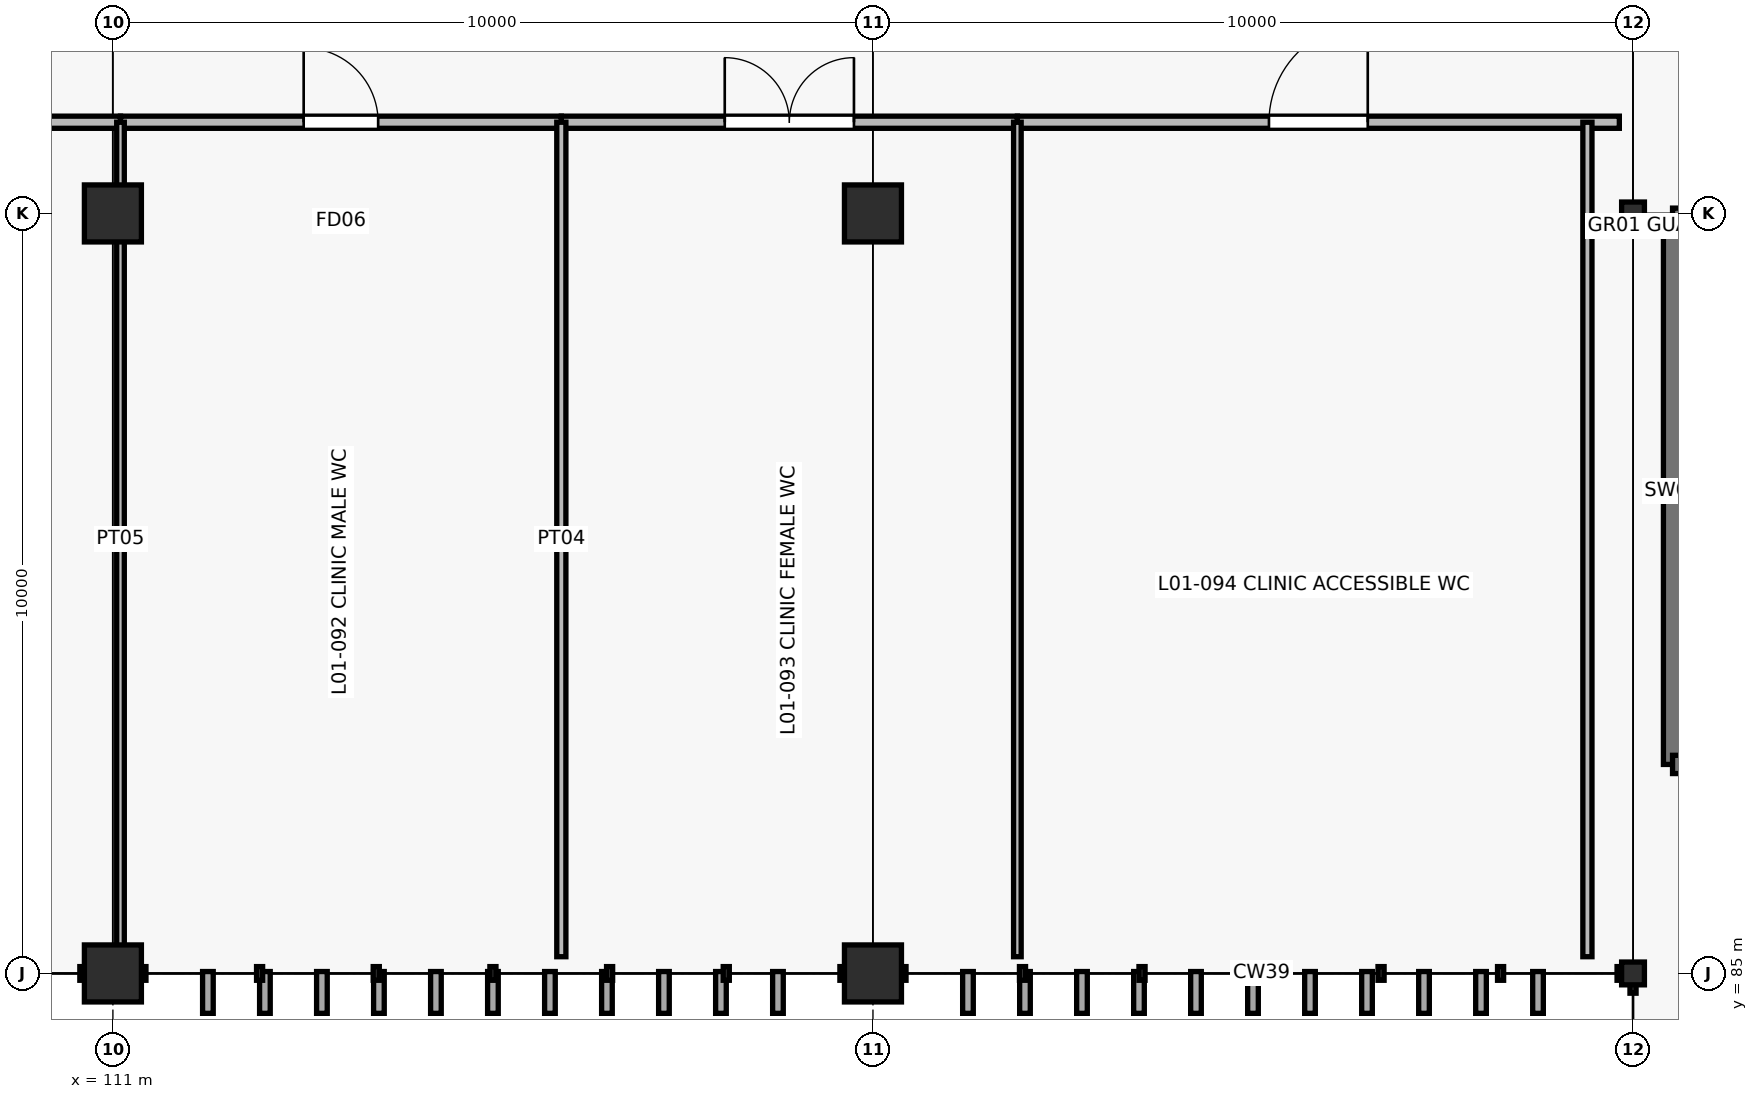
"""IFC4 building model, lengths in metres.
Left out: names, types, materials, properties, quantities, classifications, styles, units other than length and angle.
Written with IfcOpenShell. Run it as: python <this file> out.ifc"""

import sys

from ifc_helpers import new_model, si_unit, direction, frame, frame_2d, origin, origin_2d, place, context, subcontext, project, spatial, rectangle, i_section, extrude, element, fill, save


model = new_model("IFC4")
c1 = context("Model", 3, precision=1e-05, world=origin(), true_north=direction((0.0, 1.0)))
c2 = subcontext(c1, "Body", "Model", "MODEL_VIEW")
j1 = project(units=[si_unit("LENGTHUNIT", "METRE"), si_unit("PLANEANGLEUNIT", "RADIAN")], contexts=[c1])
p1 = place(None, origin())
s1 = spatial("IfcSite", under=j1, at=p1, CompositionType="ELEMENT")
p2 = place(p1, origin())
s2 = spatial("IfcBuilding", under=s1, at=p2, CompositionType="ELEMENT")
p3 = place(p2, frame((0.0, 0.0, 4.8)))
s3 = spatial("IfcBuildingStorey", under=s2, at=p3, CompositionType="ELEMENT", Elevation=4.8)
for number, where, z_axis, x_axis in (
    (1, (131.0, 85.0, 0.0), (0.0, 0.0, 1.0), (1.0, 0.0, 0.0)),
    (2, (131.0, 95.0, 0.0), (0.0, 0.0, 1.0), (1.0, 0.0, 0.0)),
):
    element("IfcColumn", number, at=place(p3, frame(where, z_axis=z_axis, x_axis=x_axis)), inside=s3, PredefinedType="COLUMN", context=c2, shape_type="SweptSolid", body=[
        extrude(i_section(OverallWidth=0.3, OverallDepth=0.3, WebThickness=0.011, FlangeThickness=0.019, at=origin_2d()), origin(), (0.0, 0.0, 1.0), 4.2),
    ])
for number, where, z_axis, x_axis in (
    (3, (111.0, 85.0, 0.0), (0.0, 0.0, 1.0), (1.0, 0.0, 0.0)),
    (4, (111.0, 95.0, 0.0), (0.0, 0.0, 1.0), (1.0, 0.0, 0.0)),
    (5, (121.0, 85.0, 0.0), (0.0, 0.0, 1.0), (1.0, 0.0, 0.0)),
    (6, (121.0, 95.0, 0.0), (0.0, 0.0, 1.0), (1.0, 0.0, 0.0)),
):
    element("IfcColumn", number, at=place(p3, frame(where, z_axis=z_axis, x_axis=x_axis)), inside=s3, PredefinedType="COLUMN", context=c2, shape_type="SweptSolid", body=[
        extrude(rectangle(XDim=0.75, YDim=0.75, at=origin_2d()), origin(), (0.0, 0.0, 1.0), 4.2),
    ])
p4 = place(p3, frame((131.52, 87.75, 0.0), z_axis=(0.0, 0.0, 1.0), x_axis=(0.0, 1.0, 0.0)))
e7 = element("IfcWall", 7, at=p4, inside=s3, PredefinedType="SHEAR", context=c2, shape_type="SweptSolid", body=[
    extrude(rectangle(XDim=7.2, YDim=0.24, at=frame_2d((3.6, 0.0))), origin(), (0.0, 0.0, 1.0), 4.2),
])
p5 = place(p3, frame((131.52, 94.95, 0.0), z_axis=(0.0, 0.0, 1.0), x_axis=(1.0, 0.0, 0.0)))
e8 = element("IfcWall", 8, at=p5, inside=s3, PredefinedType="SHEAR", context=c2, shape_type="SweptSolid", body=[
    extrude(rectangle(XDim=4.16, YDim=0.24, at=frame_2d((2.08, 0.0))), origin(), (0.0, 0.0, 1.0), 4.2),
])
p6 = place(p3, frame((131.52, 87.75, 0.0), z_axis=(0.0, 0.0, 1.0), x_axis=(1.0, 0.0, 0.0)))
e9 = element("IfcWall", 9, at=p6, inside=s3, PredefinedType="SHEAR", context=c2, shape_type="SweptSolid", body=[
    extrude(rectangle(XDim=4.16, YDim=0.24, at=frame_2d((2.08, 0.0))), origin(), (0.0, 0.0, 1.0), 4.2),
])
p7 = place(p6, frame((0.35, 0.0, 0.0)))
e10 = element("IfcOpeningElement", 10, at=p7, cuts=e9, PredefinedType="OPENING", context=c2, shape_type="SweptSolid", body=[
    extrude(rectangle(XDim=1.0, YDim=2.15, at=frame_2d((0.5, 1.075))), frame((0.0, 0.13, 0.0), z_axis=(0.0, -1.0, 0.0), x_axis=(1.0, 0.0, 0.0)), (0.0, 0.0, 1.0), 0.26),
])
p8 = place(p3, frame((91.1, 96.2, 0.0), z_axis=(0.0, 0.0, 1.0), x_axis=(1.0, 0.0, 0.0)))
e11 = element("IfcWall", 11, at=p8, inside=s3, PredefinedType="PARTITIONING", context=c2, shape_type="SweptSolid", body=[
    extrude(rectangle(XDim=20.0, YDim=0.16, at=frame_2d((10.0, 0.0))), origin(), (0.0, 0.0, 1.0), 2.925),
])
p9 = place(p8, frame((12.05, 0.0, 0.0)))
e12 = element("IfcOpeningElement", 12, at=p9, cuts=e11, PredefinedType="OPENING", context=c2, shape_type="SweptSolid", body=[
    extrude(rectangle(XDim=1.5, YDim=2.2, at=frame_2d((0.75, 1.1))), frame((0.0, 0.09, 0.0), z_axis=(0.0, -1.0, 0.0), x_axis=(1.0, 0.0, 0.0)), (0.0, 0.0, 1.0), 0.18),
])
p10 = place(p3, frame((111.1, 96.2, 0.0), z_axis=(0.0, 0.0, 1.0), x_axis=(1.0, 0.0, 0.0)))
e13 = element("IfcWall", 13, at=p10, inside=s3, PredefinedType="PARTITIONING", context=c2, shape_type="SweptSolid", body=[
    extrude(rectangle(XDim=5.8, YDim=0.16, at=frame_2d((2.9, 0.0))), origin(), (0.0, 0.0, 1.0), 2.925),
])
p11 = place(p10, frame((2.41, 0.0, 0.0)))
e14 = element("IfcOpeningElement", 14, at=p11, cuts=e13, PredefinedType="OPENING", context=c2, shape_type="SweptSolid", body=[
    extrude(rectangle(XDim=0.98, YDim=2.1, at=frame_2d((0.49, 1.05))), frame((0.0, 0.09, 0.0), z_axis=(0.0, -1.0, 0.0), x_axis=(1.0, 0.0, 0.0)), (0.0, 0.0, 1.0), 0.18),
])
p12 = place(p3, frame((111.1, 85.22, 0.0), z_axis=(0.0, 0.0, 1.0), x_axis=(0.0, 1.0, 0.0)))
e15 = element("IfcWall", 15, at=p12, inside=s3, PredefinedType="PARTITIONING", context=c2, shape_type="SweptSolid", body=[
    extrude(rectangle(XDim=10.98, YDim=0.1, at=frame_2d((5.49, 0.0))), origin(), (0.0, 0.0, 1.0), 2.925),
])
p13 = place(p3, frame((116.9, 96.2, 0.0), z_axis=(0.0, 0.0, 1.0), x_axis=(1.0, 0.0, 0.0)))
e16 = element("IfcWall", 16, at=p13, inside=s3, PredefinedType="PARTITIONING", context=c2, shape_type="SweptSolid", body=[
    extrude(rectangle(XDim=6.0, YDim=0.16, at=frame_2d((3.0, 0.0))), origin(), (0.0, 0.0, 1.0), 2.925),
])
p14 = place(p13, frame((2.15, 0.0, 0.0)))
e17 = element("IfcOpeningElement", 17, at=p14, cuts=e16, PredefinedType="OPENING", context=c2, shape_type="SweptSolid", body=[
    extrude(rectangle(XDim=1.7, YDim=2.25, at=frame_2d((0.85, 1.125))), frame((0.0, 0.09, 0.0), z_axis=(0.0, -1.0, 0.0), x_axis=(1.0, 0.0, 0.0)), (0.0, 0.0, 1.0), 0.18),
])
p15 = place(p3, frame((116.9, 85.22, 0.0), z_axis=(0.0, 0.0, 1.0), x_axis=(0.0, 1.0, 0.0)))
e18 = element("IfcWall", 18, at=p15, inside=s3, PredefinedType="PARTITIONING", context=c2, shape_type="SweptSolid", body=[
    extrude(rectangle(XDim=10.98, YDim=0.12, at=frame_2d((5.49, 0.0))), origin(), (0.0, 0.0, 1.0), 3.025),
])
p16 = place(p3, frame((122.9, 96.2, 0.0), z_axis=(0.0, 0.0, 1.0), x_axis=(1.0, 0.0, 0.0)))
e19 = element("IfcWall", 19, at=p16, inside=s3, PredefinedType="PARTITIONING", context=c2, shape_type="SweptSolid", body=[
    extrude(rectangle(XDim=7.92, YDim=0.16, at=frame_2d((3.96, 0.0))), origin(), (0.0, 0.0, 1.0), 2.925),
])
p17 = place(p16, frame((3.31, 0.0, 0.0)))
e20 = element("IfcOpeningElement", 20, at=p17, cuts=e19, PredefinedType="OPENING", context=c2, shape_type="SweptSolid", body=[
    extrude(rectangle(XDim=1.3, YDim=2.2, at=frame_2d((0.65, 1.1))), frame((0.0, 0.09, 0.0), z_axis=(0.0, -1.0, 0.0), x_axis=(1.0, 0.0, 0.0)), (0.0, 0.0, 1.0), 0.18),
])
p18 = place(p3, frame((122.9, 85.22, 0.0), z_axis=(0.0, 0.0, 1.0), x_axis=(0.0, 1.0, 0.0)))
e21 = element("IfcWall", 21, at=p18, inside=s3, PredefinedType="PARTITIONING", context=c2, shape_type="SweptSolid", body=[
    extrude(rectangle(XDim=10.98, YDim=0.1, at=frame_2d((5.49, 0.0))), origin(), (0.0, 0.0, 1.0), 3.025),
])
p19 = place(p3, frame((130.4, 85.22, 0.0), z_axis=(0.0, 0.0, 1.0), x_axis=(0.0, 1.0, 0.0)))
e22 = element("IfcWall", 22, at=p19, inside=s3, PredefinedType="PARTITIONING", context=c2, shape_type="SweptSolid", body=[
    extrude(rectangle(XDim=10.98, YDim=0.12, at=frame_2d((5.49, 0.0))), origin(), (0.0, 0.0, 1.0), 3.025),
])
p20 = place(p11, origin())
e23 = element("IfcDoor", 23, at=p20, inside=s3, OperationType="SINGLE_SWING_LEFT", PredefinedType="DOOR", context=c2, shape_type="SweptSolid", body=[
    extrude(rectangle(XDim=0.98, YDim=2.1, at=frame_2d((0.49, 1.05))), frame((0.0, 0.025, 0.0), z_axis=(0.0, -1.0, 0.0), x_axis=(1.0, 0.0, 0.0)), (0.0, 0.0, 1.0), 0.05),
])
fill(e14, e23)
p21 = place(p14, origin())
e24 = element("IfcDoor", 24, at=p21, inside=s3, OperationType="DOUBLE_DOOR_SINGLE_SWING", PredefinedType="DOOR", context=c2, shape_type="SweptSolid", body=[
    extrude(rectangle(XDim=1.7, YDim=2.25, at=frame_2d((0.85, 1.125))), frame((0.0, 0.025, 0.0), z_axis=(0.0, -1.0, 0.0), x_axis=(1.0, 0.0, 0.0)), (0.0, 0.0, 1.0), 0.05),
])
fill(e17, e24)
p22 = place(p17, origin())
e25 = element("IfcDoor", 25, at=p22, inside=s3, OperationType="SINGLE_SWING_RIGHT", PredefinedType="DOOR", context=c2, shape_type="SweptSolid", body=[
    extrude(rectangle(XDim=1.3, YDim=2.2, at=frame_2d((0.65, 1.1))), frame((0.0, 0.025, 0.0), z_axis=(0.0, -1.0, 0.0), x_axis=(1.0, 0.0, 0.0)), (0.0, 0.0, 1.0), 0.05),
])
fill(e20, e25)
save(model, sys.argv[1])
